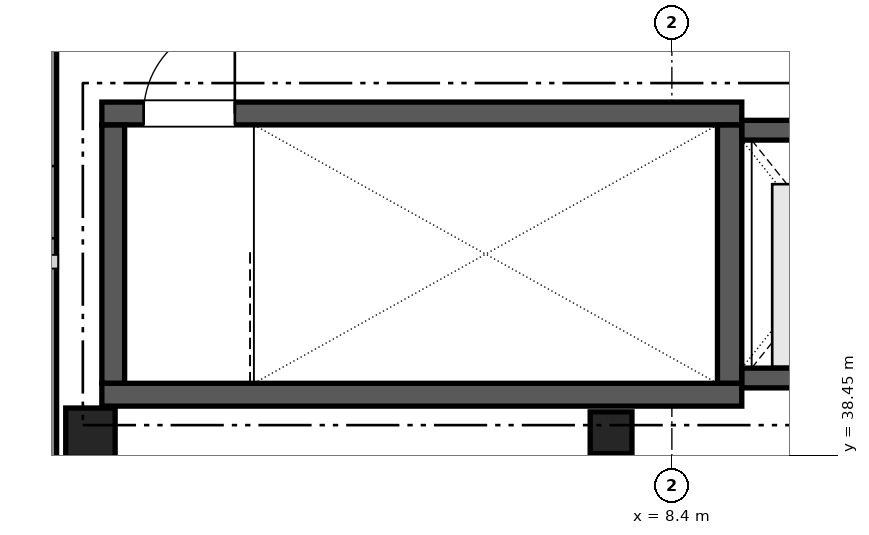
"""IFC4 building model, lengths in metres.
Left out: names, types, materials, properties, quantities, classifications, styles, units other than length and angle.
Written with IfcOpenShell. Run it as: python <this file> out.ifc"""

import sys

from ifc_helpers import new_model, si_unit, direction, frame, frame_2d, origin, origin_2d, place, context, subcontext, project, spatial, rectangle, circle, extrude, element, fill, save


model = new_model("IFC4")
c1 = context("Model", 3, precision=1e-05, world=origin(), true_north=direction((0.0, 1.0)))
c2 = subcontext(c1, "Body", "Model", "MODEL_VIEW")
j1 = project(units=[si_unit("LENGTHUNIT", "METRE"), si_unit("PLANEANGLEUNIT", "RADIAN")], contexts=[c1])
p1 = place(None, origin())
s1 = spatial("IfcSite", under=j1, at=p1, CompositionType="ELEMENT")
p2 = place(p1, origin())
s2 = spatial("IfcBuilding", under=s1, at=p2, CompositionType="ELEMENT")
p3 = place(p2, frame((0.0, 0.0, 5.1)))
s3 = spatial("IfcBuildingStorey", under=s2, at=p3, CompositionType="ELEMENT", Elevation=5.1)
p4 = place(p3, frame((0.75, 38.75, 0.0), z_axis=(0.0, 0.0, 1.0), x_axis=(1.0, 0.0, 0.0)))
e1 = element("IfcColumn", 1, at=p4, inside=s3, PredefinedType="COLUMN", context=c2, shape_type="SweptSolid", body=[
    extrude(circle(Radius=0.325, at=origin_2d()), origin(), (0.0, 0.0, 1.0), 4.42),
])
p5 = place(p3, frame((7.6, 38.75, 0.0), z_axis=(0.0, 0.0, 1.0), x_axis=(1.0, 0.0, 0.0)))
e2 = element("IfcColumn", 2, at=p5, inside=s3, PredefinedType="COLUMN", context=c2, shape_type="SweptSolid", body=[
    extrude(rectangle(XDim=0.55, YDim=0.55, at=origin_2d()), origin(), (0.0, 0.0, 1.0), 4.42),
])
p6 = place(p3, frame((0.15, 38.34, 0.0), z_axis=(0.0, 0.0, 1.0), x_axis=(0.0, 1.0, 0.0)))
e3 = element("IfcWall", 3, at=p6, inside=s3, PredefinedType="SOLIDWALL", context=c2, shape_type="SweptSolid", body=[
    extrude(rectangle(XDim=6.887, YDim=0.31, at=frame_2d((3.443, 0.0))), origin(), (0.0, 0.0, 1.0), 4.12),
])
p7 = place(p6, frame((2.968, 0.0, 0.9)))
e4 = element("IfcOpeningElement", 4, at=p7, cuts=e3, PredefinedType="OPENING", context=c2, shape_type="SweptSolid", body=[
    extrude(rectangle(XDim=0.95, YDim=1.75, at=frame_2d((0.475, 0.875))), frame((0.0, 0.165, 0.0), z_axis=(0.0, -1.0, 0.0), x_axis=(1.0, 0.0, 0.0)), (0.0, 0.0, 1.0), 0.33),
])
p8 = place(p3, frame((0.9, 39.25, 0.0), z_axis=(0.0, 0.0, 1.0), x_axis=(1.0, 0.0, 0.0)))
e5 = element("IfcWall", 5, at=p8, inside=s3, PredefinedType="SHEAR", context=c2, shape_type="SweptSolid", body=[
    extrude(rectangle(XDim=8.42, YDim=0.3, at=frame_2d((4.21, 0.0))), origin(), (0.0, 0.0, 1.0), 4.12),
])
p9 = place(p3, frame((0.9, 42.95, 0.0), z_axis=(0.0, 0.0, 1.0), x_axis=(1.0, 0.0, 0.0)))
e6 = element("IfcWall", 6, at=p9, inside=s3, PredefinedType="SHEAR", context=c2, shape_type="SweptSolid", body=[
    extrude(rectangle(XDim=8.42, YDim=0.3, at=frame_2d((4.21, 0.0))), origin(), (0.0, 0.0, 1.0), 4.12),
])
p10 = place(p9, frame((0.55, 0.0, 0.0)))
e7 = element("IfcOpeningElement", 7, at=p10, cuts=e6, PredefinedType="OPENING", context=c2, shape_type="SweptSolid", body=[
    extrude(rectangle(XDim=1.2, YDim=2.2, at=frame_2d((0.6, 1.1))), frame((0.0, 0.16, 0.0), z_axis=(0.0, -1.0, 0.0), x_axis=(1.0, 0.0, 0.0)), (0.0, 0.0, 1.0), 0.32),
])
p11 = place(p3, frame((1.05, 39.402, 0.0), z_axis=(0.0, 0.0, 1.0), x_axis=(0.0, 1.0, 0.0)))
e8 = element("IfcWall", 8, at=p11, inside=s3, PredefinedType="SHEAR", context=c2, shape_type="SweptSolid", body=[
    extrude(rectangle(XDim=3.396, YDim=0.3, at=frame_2d((1.698, 0.0))), origin(), (0.0, 0.0, 1.0), 4.12),
])
p12 = place(p3, frame((9.16, 39.402, 0.0), z_axis=(0.0, 0.0, 1.0), x_axis=(0.0, 1.0, 0.0)))
e9 = element("IfcWall", 9, at=p12, inside=s3, PredefinedType="SHEAR", context=c2, shape_type="SweptSolid", body=[
    extrude(rectangle(XDim=3.396, YDim=0.32, at=frame_2d((1.698, 0.0))), origin(), (0.0, 0.0, 1.0), 4.12),
])
p13 = place(p3, frame((9.322, 39.47, 0.0), z_axis=(0.0, 0.0, 1.0), x_axis=(1.0, 0.0, 0.0)))
e10 = element("IfcWall", 10, at=p13, inside=s3, PredefinedType="SHEAR", context=c2, shape_type="SweptSolid", body=[
    extrude(rectangle(XDim=2.658, YDim=0.26, at=frame_2d((1.329, 0.0))), origin(), (0.0, 0.0, 1.0), 4.12),
])
p14 = place(p3, frame((9.322, 42.73, 0.0), z_axis=(0.0, 0.0, 1.0), x_axis=(1.0, 0.0, 0.0)))
e11 = element("IfcWall", 11, at=p14, inside=s3, PredefinedType="SHEAR", context=c2, shape_type="SweptSolid", body=[
    extrude(rectangle(XDim=2.658, YDim=0.26, at=frame_2d((1.329, 0.0))), origin(), (0.0, 0.0, 1.0), 4.12),
])
p15 = place(p14, frame((0.679, 0.0, 0.0)))
e12 = element("IfcOpeningElement", 12, at=p15, cuts=e11, PredefinedType="OPENING", context=c2, shape_type="SweptSolid", body=[
    extrude(rectangle(XDim=1.3, YDim=2.2, at=frame_2d((0.65, 1.1))), frame((0.0, 0.14, 0.0), z_axis=(0.0, -1.0, 0.0), x_axis=(1.0, 0.0, 0.0)), (0.0, 0.0, 1.0), 0.28),
])
p16 = place(p10, origin())
e13 = element("IfcDoor", 13, at=p16, inside=s3, OperationType="SINGLE_SWING_RIGHT", PredefinedType="DOOR", context=c2, shape_type="SweptSolid", body=[
    extrude(rectangle(XDim=1.2, YDim=2.2, at=frame_2d((0.6, 1.1))), frame((0.0, 0.025, 0.0), z_axis=(0.0, -1.0, 0.0), x_axis=(1.0, 0.0, 0.0)), (0.0, 0.0, 1.0), 0.05),
])
fill(e7, e13)
save(model, sys.argv[1])
